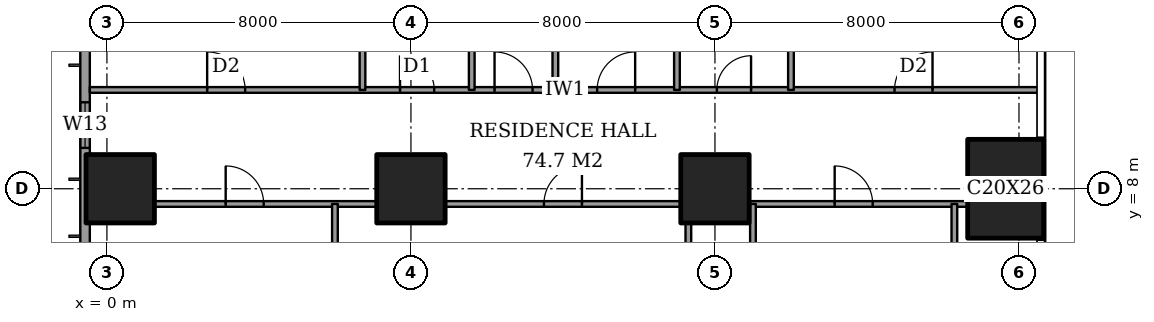
"""IFC4 building model, lengths in metres.
Left out: names, types, materials, properties, quantities, classifications, styles, units other than length and angle.
Written with IfcOpenShell. Run it as: python <this file> out.ifc"""

import sys

from ifc_helpers import new_model, si_unit, direction, frame, frame_2d, origin, origin_2d, place, context, subcontext, project, spatial, rectangle, extrude, element, fill, save


model = new_model("IFC4")
c1 = context("Model", 3, precision=1e-05, world=origin(), true_north=direction((0.0, 1.0)))
c2 = subcontext(c1, "Body", "Model", "MODEL_VIEW")
j1 = project(units=[si_unit("LENGTHUNIT", "METRE"), si_unit("PLANEANGLEUNIT", "RADIAN")], contexts=[c1])
p1 = place(None, origin())
s1 = spatial("IfcSite", under=j1, at=p1, CompositionType="ELEMENT")
p2 = place(p1, origin())
s2 = spatial("IfcBuilding", under=s1, at=p2, CompositionType="ELEMENT")
p3 = place(p2, frame((0.0, 0.0, 214.6)))
s3 = spatial("IfcBuildingStorey", under=s2, at=p3, CompositionType="ELEMENT", Elevation=214.6)
for number, where, z_axis, x_axis in (
    (1, (0.35, 8.0, 0.0), (0.0, 0.0, 1.0), (1.0, 0.0, 0.0)),
    (2, (8.0, 8.0, 0.0), (0.0, 0.0, 1.0), (1.0, 0.0, 0.0)),
    (3, (16.0, 8.0, 0.0), (0.0, 0.0, 1.0), (1.0, 0.0, 0.0)),
):
    element("IfcColumn", number, at=place(p3, frame(where, z_axis=z_axis, x_axis=x_axis)), inside=s3, PredefinedType="COLUMN", context=c2, shape_type="SweptSolid", body=[
        extrude(rectangle(XDim=1.8, YDim=1.8, at=origin_2d()), origin(), (0.0, 0.0, 1.0), 3.6),
    ])
p4 = place(p3, frame((23.65, 8.0, 0.0), z_axis=(0.0, 0.0, 1.0), x_axis=(1.0, 0.0, 0.0)))
e4 = element("IfcColumn", 4, at=p4, inside=s3, PredefinedType="COLUMN", context=c2, shape_type="SweptSolid", body=[
    extrude(rectangle(XDim=2.0, YDim=2.6, at=origin_2d()), origin(), (0.0, 0.0, 1.0), 3.6),
])
p5 = place(p3, frame((-0.575, 44.825, 0.0), z_axis=(0.0, 0.0, 1.0), x_axis=(0.0, -1.0, 0.0)))
e5 = element("IfcWall", 5, at=p5, inside=s3, PredefinedType="SOLIDWALL", context=c2, shape_type="SweptSolid", body=[
    extrude(rectangle(XDim=41.65, YDim=0.25, at=frame_2d((20.825, 0.0))), origin(), (0.0, 0.0, 1.0), 3.6),
])
p6 = place(p5, frame((0.825, 0.0, 0.2)))
e6 = element("IfcOpeningElement", 6, at=p6, cuts=e5, PredefinedType="OPENING", context=c2, shape_type="SweptSolid", body=[
    extrude(rectangle(XDim=2.4, YDim=2.4, at=frame_2d((1.2, 1.2))), frame((0.0, 0.135, 0.0), z_axis=(0.0, -1.0, 0.0), x_axis=(1.0, 0.0, 0.0)), (0.0, 0.0, 1.0), 0.27),
])
p7 = place(p5, frame((6.05, 0.0, 0.2)))
e7 = element("IfcOpeningElement", 7, at=p7, cuts=e5, PredefinedType="OPENING", context=c2, shape_type="SweptSolid", body=[
    extrude(rectangle(XDim=1.2, YDim=2.4, at=frame_2d((0.6, 1.2))), frame((0.0, 0.135, 0.0), z_axis=(0.0, -1.0, 0.0), x_axis=(1.0, 0.0, 0.0)), (0.0, 0.0, 1.0), 0.27),
])
p8 = place(p5, frame((8.225, 0.0, 0.2)))
e8 = element("IfcOpeningElement", 8, at=p8, cuts=e5, PredefinedType="OPENING", context=c2, shape_type="SweptSolid", body=[
    extrude(rectangle(XDim=2.4, YDim=2.4, at=frame_2d((1.2, 1.2))), frame((0.0, 0.135, 0.0), z_axis=(0.0, -1.0, 0.0), x_axis=(1.0, 0.0, 0.0)), (0.0, 0.0, 1.0), 0.27),
])
p9 = place(p5, frame((15.625, 0.0, 0.2)))
e9 = element("IfcOpeningElement", 9, at=p9, cuts=e5, PredefinedType="OPENING", context=c2, shape_type="SweptSolid", body=[
    extrude(rectangle(XDim=2.4, YDim=2.4, at=frame_2d((1.2, 1.2))), frame((0.0, 0.135, 0.0), z_axis=(0.0, -1.0, 0.0), x_axis=(1.0, 0.0, 0.0)), (0.0, 0.0, 1.0), 0.27),
])
p10 = place(p5, frame((23.625, 0.0, 0.2)))
e10 = element("IfcOpeningElement", 10, at=p10, cuts=e5, PredefinedType="OPENING", context=c2, shape_type="SweptSolid", body=[
    extrude(rectangle(XDim=2.4, YDim=2.4, at=frame_2d((1.2, 1.2))), frame((0.0, 0.135, 0.0), z_axis=(0.0, -1.0, 0.0), x_axis=(1.0, 0.0, 0.0)), (0.0, 0.0, 1.0), 0.27),
])
p11 = place(p5, frame((30.775, 0.0, 0.2)))
e11 = element("IfcOpeningElement", 11, at=p11, cuts=e5, PredefinedType="OPENING", context=c2, shape_type="SweptSolid", body=[
    extrude(rectangle(XDim=2.4, YDim=2.4, at=frame_2d((1.2, 1.2))), frame((0.0, 0.135, 0.0), z_axis=(0.0, -1.0, 0.0), x_axis=(1.0, 0.0, 0.0)), (0.0, 0.0, 1.0), 0.27),
])
p12 = place(p5, frame((34.55, 0.0, 0.2)))
e12 = element("IfcOpeningElement", 12, at=p12, cuts=e5, PredefinedType="OPENING", context=c2, shape_type="SweptSolid", body=[
    extrude(rectangle(XDim=1.2, YDim=2.4, at=frame_2d((0.6, 1.2))), frame((0.0, 0.135, 0.0), z_axis=(0.0, -1.0, 0.0), x_axis=(1.0, 0.0, 0.0)), (0.0, 0.0, 1.0), 0.27),
])
p13 = place(p5, frame((38.425, 0.0, 0.2)))
e13 = element("IfcOpeningElement", 13, at=p13, cuts=e5, PredefinedType="OPENING", context=c2, shape_type="SweptSolid", body=[
    extrude(rectangle(XDim=2.4, YDim=2.4, at=frame_2d((1.2, 1.2))), frame((0.0, 0.135, 0.0), z_axis=(0.0, -1.0, 0.0), x_axis=(1.0, 0.0, 0.0)), (0.0, 0.0, 1.0), 0.27),
])
p14 = place(p3, frame((1.25, 7.6, 0.0), z_axis=(0.0, 0.0, 1.0), x_axis=(1.0, 0.0, 0.0)))
e14 = element("IfcWall", 14, at=p14, inside=s3, PredefinedType="PARTITIONING", context=c2, shape_type="SweptSolid", body=[
    extrude(rectangle(XDim=5.85, YDim=0.15, at=frame_2d((2.925, 0.0))), origin(), (0.0, 0.0, 1.0), 3.35),
])
p15 = place(p14, frame((1.875, 0.0, 0.0)))
e15 = element("IfcOpeningElement", 15, at=p15, cuts=e14, PredefinedType="OPENING", context=c2, shape_type="SweptSolid", body=[
    extrude(rectangle(XDim=1.0, YDim=2.1, at=frame_2d((0.5, 1.05))), frame((0.0, 0.085, 0.0), z_axis=(0.0, -1.0, 0.0), x_axis=(1.0, 0.0, 0.0)), (0.0, 0.0, 1.0), 0.17),
])
p16 = place(p3, frame((8.9, 7.6, 0.0), z_axis=(0.0, 0.0, 1.0), x_axis=(1.0, 0.0, 0.0)))
e16 = element("IfcWall", 16, at=p16, inside=s3, PredefinedType="PARTITIONING", context=c2, shape_type="SweptSolid", body=[
    extrude(rectangle(XDim=6.2, YDim=0.15, at=frame_2d((3.1, 0.0))), origin(), (0.0, 0.0, 1.0), 3.35),
])
p17 = place(p16, frame((2.6, 0.0, 0.0)))
e17 = element("IfcOpeningElement", 17, at=p17, cuts=e16, PredefinedType="OPENING", context=c2, shape_type="SweptSolid", body=[
    extrude(rectangle(XDim=1.0, YDim=2.1, at=frame_2d((0.5, 1.05))), frame((0.0, 0.085, 0.0), z_axis=(0.0, -1.0, 0.0), x_axis=(1.0, 0.0, 0.0)), (0.0, 0.0, 1.0), 0.17),
])
p18 = place(p3, frame((16.9, 7.6, 0.0), z_axis=(0.0, 0.0, 1.0), x_axis=(1.0, 0.0, 0.0)))
e18 = element("IfcWall", 18, at=p18, inside=s3, PredefinedType="PARTITIONING", context=c2, shape_type="SweptSolid", body=[
    extrude(rectangle(XDim=5.75, YDim=0.15, at=frame_2d((2.875, 0.0))), origin(), (0.0, 0.0, 1.0), 3.35),
])
p19 = place(p18, frame((2.25, 0.0, 0.0)))
e19 = element("IfcOpeningElement", 19, at=p19, cuts=e18, PredefinedType="OPENING", context=c2, shape_type="SweptSolid", body=[
    extrude(rectangle(XDim=1.0, YDim=2.1, at=frame_2d((0.5, 1.05))), frame((0.0, 0.085, 0.0), z_axis=(0.0, -1.0, 0.0), x_axis=(1.0, 0.0, 0.0)), (0.0, 0.0, 1.0), 0.17),
])
p20 = place(p3, frame((-0.45, 10.6, 0.0), z_axis=(0.0, 0.0, 1.0), x_axis=(1.0, 0.0, 0.0)))
e20 = element("IfcWall", 20, at=p20, inside=s3, PredefinedType="PARTITIONING", context=c2, shape_type="SweptSolid", body=[
    extrude(rectangle(XDim=25.011, YDim=0.15, at=frame_2d((12.505, 0.0))), origin(), (0.0, 0.0, 1.0), 3.35),
])
p21 = place(p20, frame((10.65, 0.0, 0.0)))
e21 = element("IfcOpeningElement", 21, at=p21, cuts=e20, PredefinedType="OPENING", context=c2, shape_type="SweptSolid", body=[
    extrude(rectangle(XDim=1.0, YDim=2.1, at=frame_2d((0.5, 1.05))), frame((0.0, 0.085, 0.0), z_axis=(0.0, -1.0, 0.0), x_axis=(1.0, 0.0, 0.0)), (0.0, 0.0, 1.0), 0.17),
])
p22 = place(p20, frame((3.087, 0.0, 0.0)))
e22 = element("IfcOpeningElement", 22, at=p22, cuts=e20, PredefinedType="OPENING", context=c2, shape_type="SweptSolid", body=[
    extrude(rectangle(XDim=1.0, YDim=2.1, at=frame_2d((0.5, 1.05))), frame((0.0, 0.085, 0.0), z_axis=(0.0, -1.0, 0.0), x_axis=(1.0, 0.0, 0.0)), (0.0, 0.0, 1.0), 0.17),
])
p23 = place(p20, frame((8.163, 0.0, 0.0)))
e23 = element("IfcOpeningElement", 23, at=p23, cuts=e20, PredefinedType="OPENING", context=c2, shape_type="SweptSolid", body=[
    extrude(rectangle(XDim=0.9, YDim=2.1, at=frame_2d((0.45, 1.05))), frame((0.0, 0.085, 0.0), z_axis=(0.0, -1.0, 0.0), x_axis=(1.0, 0.0, 0.0)), (0.0, 0.0, 1.0), 0.17),
])
p24 = place(p20, frame((13.35, 0.0, 0.0)))
e24 = element("IfcOpeningElement", 24, at=p24, cuts=e20, PredefinedType="OPENING", context=c2, shape_type="SweptSolid", body=[
    extrude(rectangle(XDim=1.0, YDim=2.1, at=frame_2d((0.5, 1.05))), frame((0.0, 0.085, 0.0), z_axis=(0.0, -1.0, 0.0), x_axis=(1.0, 0.0, 0.0)), (0.0, 0.0, 1.0), 0.17),
])
p25 = place(p20, frame((16.5, 0.0, 0.0)))
e25 = element("IfcOpeningElement", 25, at=p25, cuts=e20, PredefinedType="OPENING", context=c2, shape_type="SweptSolid", body=[
    extrude(rectangle(XDim=0.9, YDim=2.1, at=frame_2d((0.45, 1.05))), frame((0.0, 0.085, 0.0), z_axis=(0.0, -1.0, 0.0), x_axis=(1.0, 0.0, 0.0)), (0.0, 0.0, 1.0), 0.17),
])
p26 = place(p20, frame((21.175, 0.0, 0.0)))
e26 = element("IfcOpeningElement", 26, at=p26, cuts=e20, PredefinedType="OPENING", context=c2, shape_type="SweptSolid", body=[
    extrude(rectangle(XDim=1.0, YDim=2.1, at=frame_2d((0.5, 1.05))), frame((0.0, 0.085, 0.0), z_axis=(0.0, -1.0, 0.0), x_axis=(1.0, 0.0, 0.0)), (0.0, 0.0, 1.0), 0.17),
])
p27 = place(p3, frame((6.0, -0.45, 0.0), z_axis=(0.0, 0.0, 1.0), x_axis=(0.0, 1.0, 0.0)))
e27 = element("IfcWall", 27, at=p27, inside=s3, PredefinedType="PARTITIONING", context=c2, shape_type="SweptSolid", body=[
    extrude(rectangle(XDim=8.05, YDim=0.15, at=frame_2d((4.025, 0.0))), origin(), (0.0, 0.0, 1.0), 3.35),
])
p28 = place(p3, frame((6.725, 10.6, 0.0), z_axis=(0.0, 0.0, 1.0), x_axis=(0.0, 1.0, 0.0)))
e28 = element("IfcWall", 28, at=p28, inside=s3, PredefinedType="PARTITIONING", context=c2, shape_type="SweptSolid", body=[
    extrude(rectangle(XDim=4.2, YDim=0.15, at=frame_2d((2.1, 0.0))), origin(), (0.0, 0.0, 1.0), 3.35),
])
p29 = place(p3, frame((9.6, 10.6, 0.0), z_axis=(0.0, 0.0, 1.0), x_axis=(0.0, 1.0, 0.0)))
e29 = element("IfcWall", 29, at=p29, inside=s3, PredefinedType="PARTITIONING", context=c2, shape_type="SweptSolid", body=[
    extrude(rectangle(XDim=11.0, YDim=0.15, at=frame_2d((5.5, 0.0))), origin(), (0.0, 0.0, 1.0), 3.35),
])
p30 = place(p29, frame((8.7, 0.0, 0.0)))
e30 = element("IfcOpeningElement", 30, at=p30, cuts=e29, PredefinedType="OPENING", context=c2, shape_type="SweptSolid", body=[
    extrude(rectangle(XDim=1.0, YDim=2.1, at=frame_2d((0.5, 1.05))), frame((0.0, 0.085, 0.0), z_axis=(0.0, -1.0, 0.0), x_axis=(1.0, 0.0, 0.0)), (0.0, 0.0, 1.0), 0.17),
])
p31 = place(p3, frame((11.8, 10.6, 0.0), z_axis=(0.0, 0.0, 1.0), x_axis=(0.0, 1.0, 0.0)))
e31 = element("IfcWall", 31, at=p31, inside=s3, PredefinedType="PARTITIONING", context=c2, shape_type="SweptSolid", body=[
    extrude(rectangle(XDim=7.4, YDim=0.15, at=frame_2d((3.7, 0.0))), origin(), (0.0, 0.0, 1.0), 3.35),
])
p32 = place(p3, frame((15.0, 10.6, 0.0), z_axis=(0.0, 0.0, 1.0), x_axis=(0.0, 1.0, 0.0)))
e32 = element("IfcWall", 32, at=p32, inside=s3, PredefinedType="PARTITIONING", context=c2, shape_type="SweptSolid", body=[
    extrude(rectangle(XDim=4.2, YDim=0.15, at=frame_2d((2.1, 0.0))), origin(), (0.0, 0.0, 1.0), 3.35),
])
p33 = place(p3, frame((15.3, 1.25, 0.0), z_axis=(0.0, 0.0, 1.0), x_axis=(0.0, 1.0, 0.0)))
e33 = element("IfcWall", 33, at=p33, inside=s3, PredefinedType="PARTITIONING", context=c2, shape_type="SweptSolid", body=[
    extrude(rectangle(XDim=5.85, YDim=0.15, at=frame_2d((2.925, 0.0))), origin(), (0.0, 0.0, 1.0), 3.35),
])
p34 = place(p33, frame((2.475, 0.0, 0.0)))
e34 = element("IfcOpeningElement", 34, at=p34, cuts=e33, PredefinedType="OPENING", context=c2, shape_type="SweptSolid", body=[
    extrude(rectangle(XDim=0.9, YDim=2.1, at=frame_2d((0.45, 1.05))), frame((0.0, 0.085, 0.0), z_axis=(0.0, -1.0, 0.0), x_axis=(1.0, 0.0, 0.0)), (0.0, 0.0, 1.0), 0.17),
])
p35 = place(p3, frame((17.0, -0.45, 0.0), z_axis=(0.0, 0.0, 1.0), x_axis=(0.0, 1.0, 0.0)))
e35 = element("IfcWall", 35, at=p35, inside=s3, PredefinedType="PARTITIONING", context=c2, shape_type="SweptSolid", body=[
    extrude(rectangle(XDim=8.05, YDim=0.15, at=frame_2d((4.025, 0.0))), origin(), (0.0, 0.0, 1.0), 3.35),
])
p36 = place(p3, frame((18.0, 10.6, 0.0), z_axis=(0.0, 0.0, 1.0), x_axis=(0.0, 1.0, 0.0)))
e36 = element("IfcWall", 36, at=p36, inside=s3, PredefinedType="PARTITIONING", context=c2, shape_type="SweptSolid", body=[
    extrude(rectangle(XDim=7.4, YDim=0.15, at=frame_2d((3.7, 0.0))), origin(), (0.0, 0.0, 1.0), 3.35),
])
p37 = place(p3, frame((22.3, -0.45, 0.0), z_axis=(0.0, 0.0, 1.0), x_axis=(0.0, 1.0, 0.0)))
e37 = element("IfcWall", 37, at=p37, inside=s3, PredefinedType="PARTITIONING", context=c2, shape_type="SweptSolid", body=[
    extrude(rectangle(XDim=8.05, YDim=0.15, at=frame_2d((4.025, 0.0))), origin(), (0.0, 0.0, 1.0), 3.35),
])
p38 = place(p37, frame((3.575, 0.0, 0.0)))
e38 = element("IfcOpeningElement", 38, at=p38, cuts=e37, PredefinedType="OPENING", context=c2, shape_type="SweptSolid", body=[
    extrude(rectangle(XDim=0.9, YDim=2.1, at=frame_2d((0.45, 1.05))), frame((0.0, 0.085, 0.0), z_axis=(0.0, -1.0, 0.0), x_axis=(1.0, 0.0, 0.0)), (0.0, 0.0, 1.0), 0.17),
])
p39 = place(p12, origin())
e39 = element("IfcWindow", 39, at=p39, inside=s3, PartitioningType="SINGLE_PANEL", PredefinedType="WINDOW", context=c2, shape_type="SweptSolid", body=[
    extrude(rectangle(XDim=1.2, YDim=2.4, at=frame_2d((0.6, 1.2))), frame((0.0, 0.03, 0.0), z_axis=(0.0, -1.0, 0.0), x_axis=(1.0, 0.0, 0.0)), (0.0, 0.0, 1.0), 0.06),
])
fill(e12, e39)
p40 = place(p15, origin())
e40 = element("IfcDoor", 40, at=p40, inside=s3, OperationType="SINGLE_SWING_RIGHT", PredefinedType="DOOR", context=c2, shape_type="SweptSolid", body=[
    extrude(rectangle(XDim=1.0, YDim=2.1, at=frame_2d((0.5, 1.05))), frame((0.0, 0.025, 0.0), z_axis=(0.0, -1.0, 0.0), x_axis=(1.0, 0.0, 0.0)), (0.0, 0.0, 1.0), 0.05),
])
fill(e15, e40)
p41 = place(p17, origin())
e41 = element("IfcDoor", 41, at=p41, inside=s3, OperationType="SINGLE_SWING_LEFT", PredefinedType="DOOR", context=c2, shape_type="SweptSolid", body=[
    extrude(rectangle(XDim=1.0, YDim=2.1, at=frame_2d((0.5, 1.05))), frame((0.0, 0.025, 0.0), z_axis=(0.0, -1.0, 0.0), x_axis=(1.0, 0.0, 0.0)), (0.0, 0.0, 1.0), 0.05),
])
fill(e17, e41)
p42 = place(p19, origin())
e42 = element("IfcDoor", 42, at=p42, inside=s3, OperationType="SINGLE_SWING_RIGHT", PredefinedType="DOOR", context=c2, shape_type="SweptSolid", body=[
    extrude(rectangle(XDim=1.0, YDim=2.1, at=frame_2d((0.5, 1.05))), frame((0.0, 0.025, 0.0), z_axis=(0.0, -1.0, 0.0), x_axis=(1.0, 0.0, 0.0)), (0.0, 0.0, 1.0), 0.05),
])
fill(e19, e42)
p43 = place(p21, origin())
e43 = element("IfcDoor", 43, at=p43, inside=s3, OperationType="SINGLE_SWING_RIGHT", PredefinedType="DOOR", context=c2, shape_type="SweptSolid", body=[
    extrude(rectangle(XDim=1.0, YDim=2.1, at=frame_2d((0.5, 1.05))), frame((0.0, 0.025, 0.0), z_axis=(0.0, -1.0, 0.0), x_axis=(1.0, 0.0, 0.0)), (0.0, 0.0, 1.0), 0.05),
])
fill(e21, e43)
p44 = place(p22, origin())
e44 = element("IfcDoor", 44, at=p44, inside=s3, OperationType="SINGLE_SWING_RIGHT", PredefinedType="DOOR", context=c2, shape_type="SweptSolid", body=[
    extrude(rectangle(XDim=1.0, YDim=2.1, at=frame_2d((0.5, 1.05))), frame((0.0, 0.025, 0.0), z_axis=(0.0, -1.0, 0.0), x_axis=(1.0, 0.0, 0.0)), (0.0, 0.0, 1.0), 0.05),
])
fill(e22, e44)
p45 = place(p23, origin())
e45 = element("IfcDoor", 45, at=p45, inside=s3, OperationType="SINGLE_SWING_RIGHT", PredefinedType="DOOR", context=c2, shape_type="SweptSolid", body=[
    extrude(rectangle(XDim=0.9, YDim=2.1, at=frame_2d((0.45, 1.05))), frame((0.0, 0.025, 0.0), z_axis=(0.0, -1.0, 0.0), x_axis=(1.0, 0.0, 0.0)), (0.0, 0.0, 1.0), 0.05),
])
fill(e23, e45)
p46 = place(p24, origin())
e46 = element("IfcDoor", 46, at=p46, inside=s3, OperationType="SINGLE_SWING_LEFT", PredefinedType="DOOR", context=c2, shape_type="SweptSolid", body=[
    extrude(rectangle(XDim=1.0, YDim=2.1, at=frame_2d((0.5, 1.05))), frame((0.0, 0.025, 0.0), z_axis=(0.0, -1.0, 0.0), x_axis=(1.0, 0.0, 0.0)), (0.0, 0.0, 1.0), 0.05),
])
fill(e24, e46)
p47 = place(p25, origin())
e47 = element("IfcDoor", 47, at=p47, inside=s3, OperationType="SINGLE_SWING_LEFT", PredefinedType="DOOR", context=c2, shape_type="SweptSolid", body=[
    extrude(rectangle(XDim=0.9, YDim=2.1, at=frame_2d((0.45, 1.05))), frame((0.0, 0.025, 0.0), z_axis=(0.0, -1.0, 0.0), x_axis=(1.0, 0.0, 0.0)), (0.0, 0.0, 1.0), 0.05),
])
fill(e25, e47)
p48 = place(p26, origin())
e48 = element("IfcDoor", 48, at=p48, inside=s3, OperationType="SINGLE_SWING_LEFT", PredefinedType="DOOR", context=c2, shape_type="SweptSolid", body=[
    extrude(rectangle(XDim=1.0, YDim=2.1, at=frame_2d((0.5, 1.05))), frame((0.0, 0.025, 0.0), z_axis=(0.0, -1.0, 0.0), x_axis=(1.0, 0.0, 0.0)), (0.0, 0.0, 1.0), 0.05),
])
fill(e26, e48)
save(model, sys.argv[1])
